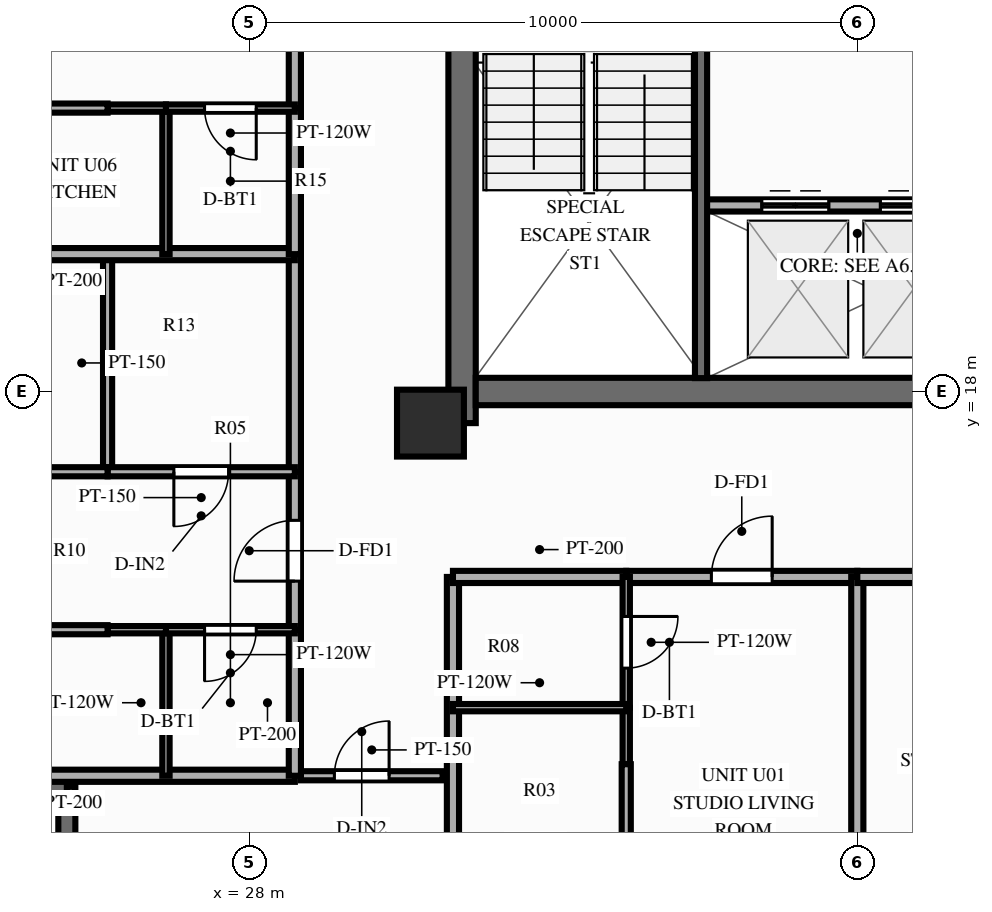
"""IFC4 building model, lengths in metres.
Left out: names, types, materials, properties, quantities, classifications, styles, units other than length and angle.
Written with IfcOpenShell. Run it as: python <this file> out.ifc"""

import sys

from ifc_helpers import new_model, si_unit, direction, frame, frame_2d, origin, origin_2d, place, context, subcontext, project, spatial, rectangle, extrude, source, transform, mapped, element, fill, save


model = new_model("IFC4")
c1 = context("Model", 3, precision=1e-05, world=origin(), true_north=direction((0.0, 1.0)))
c2 = subcontext(c1, "Body", "Model", "MODEL_VIEW")
j1 = project(units=[si_unit("LENGTHUNIT", "METRE"), si_unit("PLANEANGLEUNIT", "RADIAN")], contexts=[c1])
p1 = place(None, origin())
s1 = spatial("IfcSite", under=j1, at=p1, CompositionType="ELEMENT")
p2 = place(p1, origin())
s2 = spatial("IfcBuilding", under=s1, at=p2, CompositionType="ELEMENT")
p3 = place(p2, frame((0.0, 0.0, 199.6)))
s3 = spatial("IfcBuildingStorey", under=s2, at=p3, CompositionType="ELEMENT", Elevation=199.6)
p4 = place(p3, frame((31.5, 17.48, 0.0), z_axis=(0.0, 0.0, 1.0), x_axis=(0.0, 1.0, 0.0)))
e1 = element("IfcWall", 1, at=p4, inside=s3, PredefinedType="SHEAR", context=c2, shape_type="SweptSolid", body=[
    extrude(rectangle(XDim=19.04, YDim=0.45, at=frame_2d((9.52, 0.0))), origin(), (0.0, 0.0, 1.0), 3.0),
])
p5 = place(p4, frame((6.32, 0.0, 0.0)))
e2 = element("IfcOpeningElement", 2, at=p5, cuts=e1, PredefinedType="OPENING", context=c2, shape_type="SweptSolid", body=[
    extrude(rectangle(XDim=1.1, YDim=2.15, at=frame_2d((0.55, 1.075))), frame((0.0, 0.237, 0.0), z_axis=(0.0, -1.0, 0.0), x_axis=(1.0, 0.0, 0.0)), (0.0, 0.0, 1.0), 0.474),
])
p6 = place(p3, frame((31.725, 18.0, 0.0), z_axis=(0.0, 0.0, 1.0), x_axis=(1.0, 0.0, 0.0)))
e3 = element("IfcWall", 3, at=p6, inside=s3, PredefinedType="SHEAR", context=c2, shape_type="SweptSolid", body=[
    extrude(rectangle(XDim=12.55, YDim=0.45, at=frame_2d((6.275, 0.0))), origin(), (0.0, 0.0, 1.0), 3.0),
])
m1 = source(origin(), c2, "Body", "SweptSolid", [
    extrude(rectangle(XDim=1.1, YDim=1.1, at=origin_2d()), origin(), (0.0, 0.0, 1.0), 3.0),
])
p7 = place(p3, frame((30.98, 17.48, 0.0), z_axis=(0.0, 0.0, 1.0), x_axis=(1.0, 0.0, 0.0)))
e4 = element("IfcColumn", 4, at=p7, inside=s3, PredefinedType="COLUMN", context=c2, shape_type="MappedRepresentation", body=[
    mapped(m1, transform((0.0, 0.0, 0.0), scale=1.0)),
])
for number, where, z_axis, x_axis in (
    (5, (25.0, 6.08, 0.0), (0.0, 0.0, 1.0), (0.0, 1.0, 0.0)),
    (6, (19.58, 11.5, 0.0), (0.0, 0.0, 1.0), (1.0, 0.0, 0.0)),
):
    element("IfcWall", number, at=place(p3, frame(where, z_axis=z_axis, x_axis=x_axis)), inside=s3, PredefinedType="SOLIDWALL", context=c2, shape_type="SweptSolid", body=[
        extrude(rectangle(XDim=5.42, YDim=0.28, at=frame_2d((2.71, 0.0))), origin(), (0.0, 0.0, 1.0), 2.28),
    ])
p8 = place(p3, frame((35.43, 21.06, 0.0), z_axis=(0.0, 0.0, 1.0), x_axis=(1.0, 0.0, 0.0)))
e7 = element("IfcWall", 7, at=p8, inside=s3, PredefinedType="PARTITIONING", context=c2, shape_type="SweptSolid", body=[
    extrude(rectangle(XDim=6.02, YDim=0.2, at=frame_2d((3.01, 0.0))), origin(), (0.0, 0.0, 1.0), 2.79),
])
p9 = place(p8, frame((1.0, 0.0, 0.0)))
e8 = element("IfcOpeningElement", 8, at=p9, cuts=e7, PredefinedType="OPENING", context=c2, shape_type="SweptSolid", body=[
    extrude(rectangle(XDim=1.1, YDim=2.15, at=frame_2d((0.55, 1.075))), frame((0.0, 0.112, 0.0), z_axis=(0.0, -1.0, 0.0), x_axis=(1.0, 0.0, 0.0)), (0.0, 0.0, 1.0), 0.224),
])
p10 = place(p8, frame((2.95, 0.0, 0.0)))
e9 = element("IfcOpeningElement", 9, at=p10, cuts=e7, PredefinedType="OPENING", context=c2, shape_type="SweptSolid", body=[
    extrude(rectangle(XDim=1.1, YDim=2.15, at=frame_2d((0.55, 1.075))), frame((0.0, 0.112, 0.0), z_axis=(0.0, -1.0, 0.0), x_axis=(1.0, 0.0, 0.0)), (0.0, 0.0, 1.0), 0.224),
])
p11 = place(p8, frame((4.58, 0.0, 0.0)))
e10 = element("IfcOpeningElement", 10, at=p11, cuts=e7, PredefinedType="OPENING", context=c2, shape_type="SweptSolid", body=[
    extrude(rectangle(XDim=1.2, YDim=2.15, at=frame_2d((0.6, 1.075))), frame((0.0, 0.112, 0.0), z_axis=(0.0, -1.0, 0.0), x_axis=(1.0, 0.0, 0.0)), (0.0, 0.0, 1.0), 0.224),
])
p12 = place(p3, frame((35.43, 18.22, 0.0), z_axis=(0.0, 0.0, 1.0), x_axis=(0.0, 1.0, 0.0)))
e11 = element("IfcWall", 11, at=p12, inside=s3, PredefinedType="SOLIDWALL", context=c2, shape_type="SweptSolid", body=[
    extrude(rectangle(XDim=7.22, YDim=0.2, at=frame_2d((3.61, 0.0))), origin(), (0.0, 0.0, 1.0), 2.79),
])
p13 = place(p12, frame((6.68, 0.0, 0.0), z_axis=(0.0, 0.0, 1.0), x_axis=(-1.0, 0.0, 0.0)))
e12 = element("IfcOpeningElement", 12, at=p13, cuts=e11, PredefinedType="OPENING", context=c2, shape_type="SweptSolid", body=[
    extrude(rectangle(XDim=1.1, YDim=2.15, at=frame_2d((0.55, 1.075))), frame((0.0, 0.112, 0.0), z_axis=(0.0, -1.0, 0.0), x_axis=(1.0, 0.0, 0.0)), (0.0, 0.0, 1.0), 0.224),
])
p14 = place(p3, frame((28.85, 11.68, 0.0), z_axis=(0.0, 0.0, 1.0), x_axis=(1.0, 0.0, 0.0)))
e13 = element("IfcWall", 13, at=p14, inside=s3, PredefinedType="PARTITIONING", context=c2, shape_type="SweptSolid", body=[
    extrude(rectangle(XDim=2.33, YDim=0.15, at=frame_2d((1.165, 0.0))), origin(), (0.0, 0.0, 1.0), 2.79),
])
p15 = place(p14, frame((0.55, 0.0, 0.0)))
e14 = element("IfcOpeningElement", 14, at=p15, cuts=e13, PredefinedType="OPENING", context=c2, shape_type="SweptSolid", body=[
    extrude(rectangle(XDim=0.9, YDim=2.1, at=frame_2d((0.45, 1.05))), frame((0.0, 0.087, 0.0), z_axis=(0.0, -1.0, 0.0), x_axis=(1.0, 0.0, 0.0)), (0.0, 0.0, 1.0), 0.174),
])
p16 = place(p3, frame((31.35, 14.95, 0.0), z_axis=(0.0, 0.0, 1.0), x_axis=(0.0, -1.0, 0.0)))
e15 = element("IfcWall", 15, at=p16, inside=s3, PredefinedType="PARTITIONING", context=c2, shape_type="SweptSolid", body=[
    extrude(rectangle(XDim=8.8, YDim=0.2, at=frame_2d((4.4, 0.0))), origin(), (0.0, 0.0, 1.0), 2.39),
])
p17 = place(p3, frame((31.35, 14.95, 0.0), z_axis=(0.0, 0.0, 1.0), x_axis=(1.0, 0.0, 0.0)))
e16 = element("IfcWall", 16, at=p17, inside=s3, PredefinedType="PARTITIONING", context=c2, shape_type="SweptSolid", body=[
    extrude(rectangle(XDim=2.85, YDim=0.2, at=frame_2d((1.425, 0.0))), origin(), (0.0, 0.0, 1.0), 2.79),
])
p18 = place(p3, frame((34.2, 14.95, 0.0), z_axis=(0.0, 0.0, 1.0), x_axis=(1.0, 0.0, 0.0)))
e17 = element("IfcWall", 17, at=p18, inside=s3, PredefinedType="PARTITIONING", context=c2, shape_type="SweptSolid", body=[
    extrude(rectangle(XDim=3.8, YDim=0.2, at=frame_2d((1.9, 0.0))), origin(), (0.0, 0.0, 1.0), 2.79),
])
p19 = place(p18, frame((1.4, 0.0, 0.0)))
e18 = element("IfcOpeningElement", 18, at=p19, cuts=e17, PredefinedType="OPENING", context=c2, shape_type="SweptSolid", body=[
    extrude(rectangle(XDim=1.0, YDim=2.15, at=frame_2d((0.5, 1.075))), frame((0.0, 0.112, 0.0), z_axis=(0.0, -1.0, 0.0), x_axis=(1.0, 0.0, 0.0)), (0.0, 0.0, 1.0), 0.224),
])
p20 = place(p3, frame((34.2, 14.95, 0.0), z_axis=(0.0, 0.0, 1.0), x_axis=(0.0, -1.0, 0.0)))
e19 = element("IfcWall", 19, at=p20, inside=s3, PredefinedType="PARTITIONING", context=c2, shape_type="SweptSolid", body=[
    extrude(rectangle(XDim=2.15, YDim=0.12, at=frame_2d((1.075, 0.0))), origin(), (0.0, 0.0, 1.0), 2.79),
])
p21 = place(p20, frame((0.65, 0.0, 0.0)))
e20 = element("IfcOpeningElement", 20, at=p21, cuts=e19, PredefinedType="OPENING", context=c2, shape_type="SweptSolid", body=[
    extrude(rectangle(XDim=0.85, YDim=2.05, at=frame_2d((0.425, 1.025))), frame((0.0, 0.072, 0.0), z_axis=(0.0, -1.0, 0.0), x_axis=(1.0, 0.0, 0.0)), (0.0, 0.0, 1.0), 0.144),
])
p22 = place(p3, frame((34.2, 12.8, 0.0), z_axis=(0.0, 0.0, 1.0), x_axis=(0.0, -1.0, 0.0)))
e21 = element("IfcWall", 21, at=p22, inside=s3, PredefinedType="PARTITIONING", context=c2, shape_type="SweptSolid", body=[
    extrude(rectangle(XDim=0.93, YDim=0.12, at=frame_2d((0.465, 0.0))), origin(), (0.0, 0.0, 1.0), 2.79),
])
p23 = place(p3, frame((31.35, 12.8, 0.0), z_axis=(0.0, 0.0, 1.0), x_axis=(1.0, 0.0, 0.0)))
e22 = element("IfcWall", 22, at=p23, inside=s3, PredefinedType="PARTITIONING", context=c2, shape_type="SweptSolid", body=[
    extrude(rectangle(XDim=2.85, YDim=0.12, at=frame_2d((1.425, 0.0))), origin(), (0.0, 0.0, 1.0), 2.79),
])
p24 = place(p3, frame((34.2, 11.87, 0.0), z_axis=(0.0, 0.0, 1.0), x_axis=(0.0, -1.0, 0.0)))
e23 = element("IfcWall", 23, at=p24, inside=s3, PredefinedType="PARTITIONING", context=c2, shape_type="SweptSolid", body=[
    extrude(rectangle(XDim=5.72, YDim=0.15, at=frame_2d((2.86, 0.0))), origin(), (0.0, 0.0, 1.0), 2.79),
])
p25 = place(p24, frame((2.229, 0.0, 0.0)))
e24 = element("IfcOpeningElement", 24, at=p25, cuts=e23, PredefinedType="OPENING", context=c2, shape_type="SweptSolid", body=[
    extrude(rectangle(XDim=0.9, YDim=2.1, at=frame_2d((0.45, 1.05))), frame((0.0, 0.087, 0.0), z_axis=(0.0, -1.0, 0.0), x_axis=(1.0, 0.0, 0.0)), (0.0, 0.0, 1.0), 0.174),
])
p26 = place(p3, frame((38.0, 14.95, 0.0), z_axis=(0.0, 0.0, 1.0), x_axis=(0.0, -1.0, 0.0)))
e25 = element("IfcWall", 25, at=p26, inside=s3, PredefinedType="PARTITIONING", context=c2, shape_type="SweptSolid", body=[
    extrude(rectangle(XDim=8.8, YDim=0.2, at=frame_2d((4.4, 0.0))), origin(), (0.0, 0.0, 1.0), 2.79),
])
p27 = place(p3, frame((38.0, 14.95, 0.0), z_axis=(0.0, 0.0, 1.0), x_axis=(1.0, 0.0, 0.0)))
e26 = element("IfcWall", 26, at=p27, inside=s3, PredefinedType="PARTITIONING", context=c2, shape_type="SweptSolid", body=[
    extrude(rectangle(XDim=3.8, YDim=0.2, at=frame_2d((1.9, 0.0))), origin(), (0.0, 0.0, 1.0), 2.79),
])
p28 = place(p27, frame((1.4, 0.0, 0.0)))
e27 = element("IfcOpeningElement", 27, at=p28, cuts=e26, PredefinedType="OPENING", context=c2, shape_type="SweptSolid", body=[
    extrude(rectangle(XDim=1.0, YDim=2.15, at=frame_2d((0.5, 1.075))), frame((0.0, 0.112, 0.0), z_axis=(0.0, -1.0, 0.0), x_axis=(1.0, 0.0, 0.0)), (0.0, 0.0, 1.0), 0.224),
])
p29 = place(p3, frame((28.75, 11.68, 0.0), z_axis=(0.0, 0.0, 1.0), x_axis=(-1.0, 0.0, 0.0)))
e28 = element("IfcWall", 28, at=p29, inside=s3, PredefinedType="PARTITIONING", context=c2, shape_type="SweptSolid", body=[
    extrude(rectangle(XDim=9.1, YDim=0.2, at=frame_2d((4.55, 0.0))), origin(), (0.0, 0.0, 1.0), 2.79),
])
p30 = place(p3, frame((28.75, 11.68, 0.0), z_axis=(0.0, 0.0, 1.0), x_axis=(0.0, 1.0, 0.0)))
e29 = element("IfcWall", 29, at=p30, inside=s3, PredefinedType="PARTITIONING", context=c2, shape_type="SweptSolid", body=[
    extrude(rectangle(XDim=2.402, YDim=0.2, at=frame_2d((1.201, 0.0))), origin(), (0.0, 0.0, 1.0), 2.79),
])
p31 = place(p3, frame((28.75, 14.082, 0.0), z_axis=(0.0, 0.0, 1.0), x_axis=(0.0, 1.0, 0.0)))
e30 = element("IfcWall", 30, at=p31, inside=s3, PredefinedType="PARTITIONING", context=c2, shape_type="SweptSolid", body=[
    extrude(rectangle(XDim=2.598, YDim=0.2, at=frame_2d((1.299, 0.0))), origin(), (0.0, 0.0, 1.0), 2.79),
])
p32 = place(p31, frame((0.799, 0.0, 0.0)))
e31 = element("IfcOpeningElement", 31, at=p32, cuts=e30, PredefinedType="OPENING", context=c2, shape_type="SweptSolid", body=[
    extrude(rectangle(XDim=1.0, YDim=2.15, at=frame_2d((0.5, 1.075))), frame((0.0, 0.112, 0.0), z_axis=(0.0, -1.0, 0.0), x_axis=(1.0, 0.0, 0.0)), (0.0, 0.0, 1.0), 0.224),
])
p33 = place(p3, frame((28.75, 16.68, 0.0), z_axis=(0.0, 0.0, 1.0), x_axis=(0.0, 1.0, 0.0)))
e32 = element("IfcWall", 32, at=p33, inside=s3, PredefinedType="PARTITIONING", context=c2, shape_type="SweptSolid", body=[
    extrude(rectangle(XDim=3.579, YDim=0.2, at=frame_2d((1.79, 0.0))), origin(), (0.0, 0.0, 1.0), 2.79),
])
p34 = place(p3, frame((26.63, 11.68, 0.0), z_axis=(0.0, 0.0, 1.0), x_axis=(0.0, 1.0, 0.0)))
e33 = element("IfcWall", 33, at=p34, inside=s3, PredefinedType="PARTITIONING", context=c2, shape_type="SweptSolid", body=[
    extrude(rectangle(XDim=2.402, YDim=0.12, at=frame_2d((1.201, 0.0))), origin(), (0.0, 0.0, 1.0), 2.79),
])
p35 = place(p3, frame((25.67, 16.68, 0.0), z_axis=(0.0, 0.0, 1.0), x_axis=(0.0, 1.0, 0.0)))
e34 = element("IfcWall", 34, at=p35, inside=s3, PredefinedType="PARTITIONING", context=c2, shape_type="SweptSolid", body=[
    extrude(rectangle(XDim=3.579, YDim=0.15, at=frame_2d((1.79, 0.0))), origin(), (0.0, 0.0, 1.0), 2.49),
])
p36 = place(p3, frame((28.75, 14.082, 0.0), z_axis=(0.0, 0.0, 1.0), x_axis=(-1.0, 0.0, 0.0)))
e35 = element("IfcWall", 35, at=p36, inside=s3, PredefinedType="PARTITIONING", context=c2, shape_type="SweptSolid", body=[
    extrude(rectangle(XDim=2.12, YDim=0.12, at=frame_2d((1.06, 0.0))), origin(), (0.0, 0.0, 1.0), 2.79),
])
p37 = place(p36, frame((0.635, 0.0, 0.0)))
e36 = element("IfcOpeningElement", 36, at=p37, cuts=e35, PredefinedType="OPENING", context=c2, shape_type="SweptSolid", body=[
    extrude(rectangle(XDim=0.85, YDim=2.05, at=frame_2d((0.425, 1.025))), frame((0.0, 0.072, 0.0), z_axis=(0.0, -1.0, 0.0), x_axis=(1.0, 0.0, 0.0)), (0.0, 0.0, 1.0), 0.144),
])
p38 = place(p3, frame((26.63, 14.082, 0.0), z_axis=(0.0, 0.0, 1.0), x_axis=(-1.0, 0.0, 0.0)))
e37 = element("IfcWall", 37, at=p38, inside=s3, PredefinedType="PARTITIONING", context=c2, shape_type="SweptSolid", body=[
    extrude(rectangle(XDim=0.96, YDim=0.12, at=frame_2d((0.48, 0.0))), origin(), (0.0, 0.0, 1.0), 2.79),
])
p39 = place(p3, frame((25.67, 14.082, 0.0), z_axis=(0.0, 0.0, 1.0), x_axis=(-1.0, 0.0, 0.0)))
e38 = element("IfcWall", 38, at=p39, inside=s3, PredefinedType="PARTITIONING", context=c2, shape_type="SweptSolid", body=[
    extrude(rectangle(XDim=6.02, YDim=0.15, at=frame_2d((3.01, 0.0))), origin(), (0.0, 0.0, 1.0), 2.79),
])
p40 = place(p39, frame((2.367, 0.0, 0.0)))
e39 = element("IfcOpeningElement", 39, at=p40, cuts=e38, PredefinedType="OPENING", context=c2, shape_type="SweptSolid", body=[
    extrude(rectangle(XDim=0.9, YDim=2.1, at=frame_2d((0.45, 1.05))), frame((0.0, 0.087, 0.0), z_axis=(0.0, -1.0, 0.0), x_axis=(1.0, 0.0, 0.0)), (0.0, 0.0, 1.0), 0.174),
])
p41 = place(p3, frame((28.75, 16.68, 0.0), z_axis=(0.0, 0.0, 1.0), x_axis=(-1.0, 0.0, 0.0)))
e40 = element("IfcWall", 40, at=p41, inside=s3, PredefinedType="PARTITIONING", context=c2, shape_type="SweptSolid", body=[
    extrude(rectangle(XDim=3.08, YDim=0.15, at=frame_2d((1.54, 0.0))), origin(), (0.0, 0.0, 1.0), 2.79),
])
p42 = place(p41, frame((1.09, 0.0, 0.0)))
e41 = element("IfcOpeningElement", 41, at=p42, cuts=e40, PredefinedType="OPENING", context=c2, shape_type="SweptSolid", body=[
    extrude(rectangle(XDim=0.9, YDim=2.1, at=frame_2d((0.45, 1.05))), frame((0.0, 0.087, 0.0), z_axis=(0.0, -1.0, 0.0), x_axis=(1.0, 0.0, 0.0)), (0.0, 0.0, 1.0), 0.174),
])
p43 = place(p3, frame((25.67, 16.68, 0.0), z_axis=(0.0, 0.0, 1.0), x_axis=(-1.0, 0.0, 0.0)))
e42 = element("IfcWall", 42, at=p43, inside=s3, PredefinedType="PARTITIONING", context=c2, shape_type="SweptSolid", body=[
    extrude(rectangle(XDim=6.02, YDim=0.15, at=frame_2d((3.01, 0.0))), origin(), (0.0, 0.0, 1.0), 2.79),
])
p44 = place(p43, frame((2.367, 0.0, 0.0)))
e43 = element("IfcOpeningElement", 43, at=p44, cuts=e42, PredefinedType="OPENING", context=c2, shape_type="SweptSolid", body=[
    extrude(rectangle(XDim=0.9, YDim=2.1, at=frame_2d((0.45, 1.05))), frame((0.0, 0.087, 0.0), z_axis=(0.0, -1.0, 0.0), x_axis=(1.0, 0.0, 0.0)), (0.0, 0.0, 1.0), 0.174),
])
p45 = place(p3, frame((28.75, 20.259, 0.0), z_axis=(0.0, 0.0, 1.0), x_axis=(-1.0, 0.0, 0.0)))
e44 = element("IfcWall", 44, at=p45, inside=s3, PredefinedType="PARTITIONING", context=c2, shape_type="SweptSolid", body=[
    extrude(rectangle(XDim=9.1, YDim=0.2, at=frame_2d((4.55, 0.0))), origin(), (0.0, 0.0, 1.0), 2.79),
])
p46 = place(p3, frame((28.75, 20.259, 0.0), z_axis=(0.0, 0.0, 1.0), x_axis=(0.0, 1.0, 0.0)))
e45 = element("IfcWall", 45, at=p46, inside=s3, PredefinedType="PARTITIONING", context=c2, shape_type="SweptSolid", body=[
    extrude(rectangle(XDim=2.402, YDim=0.2, at=frame_2d((1.201, 0.0))), origin(), (0.0, 0.0, 1.0), 2.79),
])
p47 = place(p3, frame((28.75, 22.661, 0.0), z_axis=(0.0, 0.0, 1.0), x_axis=(0.0, 1.0, 0.0)))
e46 = element("IfcWall", 46, at=p47, inside=s3, PredefinedType="PARTITIONING", context=c2, shape_type="SweptSolid", body=[
    extrude(rectangle(XDim=2.917, YDim=0.2, at=frame_2d((1.458, 0.0))), origin(), (0.0, 0.0, 1.0), 2.79),
])
p48 = place(p47, frame((0.958, 0.0, 0.0)))
e47 = element("IfcOpeningElement", 47, at=p48, cuts=e46, PredefinedType="OPENING", context=c2, shape_type="SweptSolid", body=[
    extrude(rectangle(XDim=1.0, YDim=2.15, at=frame_2d((0.5, 1.075))), frame((0.0, 0.112, 0.0), z_axis=(0.0, -1.0, 0.0), x_axis=(1.0, 0.0, 0.0)), (0.0, 0.0, 1.0), 0.224),
])
p49 = place(p3, frame((26.63, 20.259, 0.0), z_axis=(0.0, 0.0, 1.0), x_axis=(0.0, 1.0, 0.0)))
e48 = element("IfcWall", 48, at=p49, inside=s3, PredefinedType="PARTITIONING", context=c2, shape_type="SweptSolid", body=[
    extrude(rectangle(XDim=2.402, YDim=0.12, at=frame_2d((1.201, 0.0))), origin(), (0.0, 0.0, 1.0), 2.79),
])
p50 = place(p3, frame((28.75, 22.661, 0.0), z_axis=(0.0, 0.0, 1.0), x_axis=(-1.0, 0.0, 0.0)))
e49 = element("IfcWall", 49, at=p50, inside=s3, PredefinedType="PARTITIONING", context=c2, shape_type="SweptSolid", body=[
    extrude(rectangle(XDim=2.12, YDim=0.12, at=frame_2d((1.06, 0.0))), origin(), (0.0, 0.0, 1.0), 2.79),
])
p51 = place(p50, frame((0.635, 0.0, 0.0)))
e50 = element("IfcOpeningElement", 50, at=p51, cuts=e49, PredefinedType="OPENING", context=c2, shape_type="SweptSolid", body=[
    extrude(rectangle(XDim=0.85, YDim=2.05, at=frame_2d((0.425, 1.025))), frame((0.0, 0.072, 0.0), z_axis=(0.0, -1.0, 0.0), x_axis=(1.0, 0.0, 0.0)), (0.0, 0.0, 1.0), 0.144),
])
p52 = place(p3, frame((26.63, 22.661, 0.0), z_axis=(0.0, 0.0, 1.0), x_axis=(-1.0, 0.0, 0.0)))
e51 = element("IfcWall", 51, at=p52, inside=s3, PredefinedType="PARTITIONING", context=c2, shape_type="SweptSolid", body=[
    extrude(rectangle(XDim=0.96, YDim=0.12, at=frame_2d((0.48, 0.0))), origin(), (0.0, 0.0, 1.0), 2.79),
])
p53 = place(p3, frame((25.67, 22.661, 0.0), z_axis=(0.0, 0.0, 1.0), x_axis=(-1.0, 0.0, 0.0)))
e52 = element("IfcWall", 52, at=p53, inside=s3, PredefinedType="PARTITIONING", context=c2, shape_type="SweptSolid", body=[
    extrude(rectangle(XDim=6.02, YDim=0.15, at=frame_2d((3.01, 0.0))), origin(), (0.0, 0.0, 1.0), 2.79),
])
p54 = place(p53, frame((2.367, 0.0, 0.0)))
e53 = element("IfcOpeningElement", 53, at=p54, cuts=e52, PredefinedType="OPENING", context=c2, shape_type="SweptSolid", body=[
    extrude(rectangle(XDim=0.9, YDim=2.1, at=frame_2d((0.45, 1.05))), frame((0.0, 0.087, 0.0), z_axis=(0.0, -1.0, 0.0), x_axis=(1.0, 0.0, 0.0)), (0.0, 0.0, 1.0), 0.174),
])
m2 = source(origin(), c2, "Body", "SweptSolid", [
    extrude(rectangle(XDim=1.1, YDim=2.15, at=frame_2d((0.55, 1.075))), frame((0.0, 0.025, 0.0), z_axis=(0.0, -1.0, 0.0), x_axis=(1.0, 0.0, 0.0)), (0.0, 0.0, 1.0), 0.05),
])
p55 = place(p9, origin())
e54 = element("IfcDoor", 54, at=p55, inside=s3, OperationType="DOUBLE_DOOR_SLIDING", PredefinedType="DOOR", context=c2, shape_type="MappedRepresentation", body=[
    mapped(m2, transform((0.0, 0.0, 0.0), scale=1.0)),
])
fill(e8, e54)
p56 = place(p10, origin())
e55 = element("IfcDoor", 55, at=p56, inside=s3, OperationType="DOUBLE_DOOR_SLIDING", PredefinedType="DOOR", context=c2, shape_type="MappedRepresentation", body=[
    mapped(m2, transform((0.0, 0.0, 0.0), scale=1.0)),
])
fill(e9, e55)
m3 = source(origin(), c2, "Body", "SweptSolid", [
    extrude(rectangle(XDim=0.9, YDim=2.1, at=frame_2d((0.45, 1.05))), frame((0.0, 0.025, 0.0), z_axis=(0.0, -1.0, 0.0), x_axis=(1.0, 0.0, 0.0)), (0.0, 0.0, 1.0), 0.05),
])
p57 = place(p15, origin())
e56 = element("IfcDoor", 56, at=p57, inside=s3, OperationType="SINGLE_SWING_RIGHT", PredefinedType="DOOR", context=c2, shape_type="MappedRepresentation", body=[
    mapped(m3, transform((0.0, 0.0, 0.0), scale=1.0)),
])
fill(e14, e56)
m4 = source(origin(), c2, "Body", "SweptSolid", [
    extrude(rectangle(XDim=1.0, YDim=2.15, at=frame_2d((0.5, 1.075))), frame((0.0, 0.025, 0.0), z_axis=(0.0, -1.0, 0.0), x_axis=(1.0, 0.0, 0.0)), (0.0, 0.0, 1.0), 0.05),
])
p58 = place(p19, origin())
e57 = element("IfcDoor", 57, at=p58, inside=s3, OperationType="SINGLE_SWING_RIGHT", PredefinedType="DOOR", context=c2, shape_type="MappedRepresentation", body=[
    mapped(m4, transform((0.0, 0.0, 0.0), scale=1.0)),
])
fill(e18, e57)
m5 = source(origin(), c2, "Body", "SweptSolid", [
    extrude(rectangle(XDim=0.85, YDim=2.05, at=frame_2d((0.425, 1.025))), frame((0.0, 0.025, 0.0), z_axis=(0.0, -1.0, 0.0), x_axis=(1.0, 0.0, 0.0)), (0.0, 0.0, 1.0), 0.05),
])
p59 = place(p21, origin())
e58 = element("IfcDoor", 58, at=p59, inside=s3, OperationType="SINGLE_SWING_LEFT", PredefinedType="DOOR", context=c2, shape_type="MappedRepresentation", body=[
    mapped(m5, transform((0.0, 0.0, 0.0), scale=1.0)),
])
fill(e20, e58)
p60 = place(p32, origin())
e59 = element("IfcDoor", 59, at=p60, inside=s3, OperationType="SINGLE_SWING_LEFT", PredefinedType="DOOR", context=c2, shape_type="MappedRepresentation", body=[
    mapped(m4, transform((0.0, 0.0, 0.0), scale=1.0)),
])
fill(e31, e59)
p61 = place(p37, origin())
e60 = element("IfcDoor", 60, at=p61, inside=s3, OperationType="SINGLE_SWING_RIGHT", PredefinedType="DOOR", context=c2, shape_type="MappedRepresentation", body=[
    mapped(m5, transform((0.0, 0.0, 0.0), scale=1.0)),
])
fill(e36, e60)
p62 = place(p42, origin())
e61 = element("IfcDoor", 61, at=p62, inside=s3, OperationType="SINGLE_SWING_RIGHT", PredefinedType="DOOR", context=c2, shape_type="MappedRepresentation", body=[
    mapped(m3, transform((0.0, 0.0, 0.0), scale=1.0)),
])
fill(e41, e61)
p63 = place(p51, origin())
e62 = element("IfcDoor", 62, at=p63, inside=s3, OperationType="SINGLE_SWING_LEFT", PredefinedType="DOOR", context=c2, shape_type="MappedRepresentation", body=[
    mapped(m5, transform((0.0, 0.0, 0.0), scale=1.0)),
])
fill(e50, e62)
save(model, sys.argv[1])
